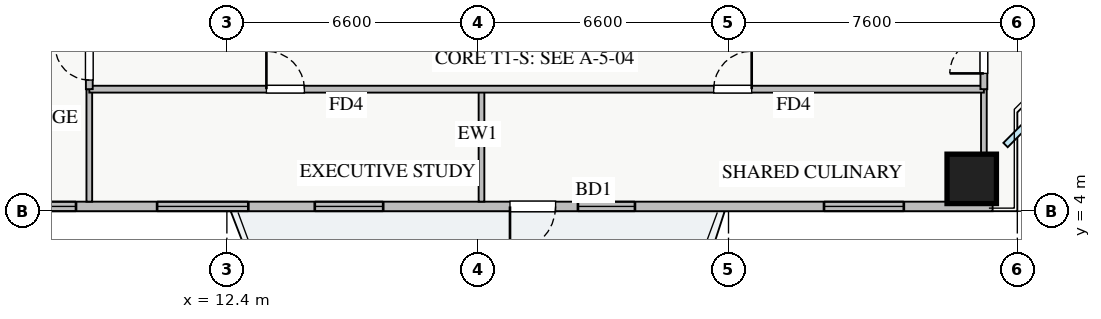
"""IFC4 building model, lengths in metres.
Left out: names, types, materials, properties, quantities, classifications, styles, units other than length and angle.
Written with IfcOpenShell. Run it as: python <this file> out.ifc"""

import sys

from ifc_helpers import new_model, si_unit, direction, frame, frame_2d, origin, origin_2d, place, context, subcontext, project, spatial, rectangle, extrude, source, transform, mapped, element, fill, save


model = new_model("IFC4")
c1 = context("Model", 3, precision=1e-05, world=origin(), true_north=direction((0.0, 1.0)))
c2 = subcontext(c1, "Body", "Model", "MODEL_VIEW")
j1 = project(units=[si_unit("LENGTHUNIT", "METRE"), si_unit("PLANEANGLEUNIT", "RADIAN")], contexts=[c1])
p1 = place(None, origin())
s1 = spatial("IfcSite", under=j1, at=p1, CompositionType="ELEMENT")
p2 = place(p1, origin())
s2 = spatial("IfcBuilding", under=s1, at=p2, CompositionType="ELEMENT")
p3 = place(p2, frame((0.0, 0.0, 69.75)))
s3 = spatial("IfcBuildingStorey", under=s2, at=p3, CompositionType="ELEMENT", Elevation=69.75)
m1 = source(origin(), c2, "Body", "SweptSolid", [
    extrude(rectangle(XDim=1.3, YDim=1.3, at=origin_2d()), origin(), (0.0, 0.0, 1.0), 3.25),
])
p4 = place(p3, frame((32.0, 4.85, 0.0), z_axis=(0.0, 0.0, 1.0), x_axis=(1.0, 0.0, 0.0)))
e1 = element("IfcColumn", 1, at=p4, inside=s3, PredefinedType="COLUMN", context=c2, shape_type="MappedRepresentation", body=[
    mapped(m1, transform((0.0, 0.0, 0.0), x_axis=(1.0, 0.0, 0.0), y_axis=(0.0, 1.0, 0.0), z_axis=(0.0, 0.0, 1.0), scale=1.0)),
])
p5 = place(p3, frame((5.45, 4.125, 0.0), z_axis=(0.0, 0.0, 1.0), x_axis=(1.0, 0.0, 0.0)))
e2 = element("IfcWall", 2, at=p5, inside=s3, PredefinedType="STANDARD", context=c2, shape_type="SweptSolid", body=[
    extrude(rectangle(XDim=27.1, YDim=0.25, at=frame_2d((13.55, 0.0))), origin(), (0.0, 0.0, 1.0), 2.61),
])
p6 = place(p5, frame((14.4, 0.0, 0.0)))
e3 = element("IfcOpeningElement", 3, at=p6, cuts=e2, PredefinedType="OPENING", context=c2, shape_type="SweptSolid", body=[
    extrude(rectangle(XDim=1.2, YDim=2.1, at=frame_2d((0.6, 1.05))), frame((0.0, 0.135, 0.0), z_axis=(0.0, -1.0, 0.0), x_axis=(1.0, 0.0, 0.0)), (0.0, 0.0, 1.0), 0.27),
])
p7 = place(p5, frame((1.48, 0.0, 0.9)))
e4 = element("IfcOpeningElement", 4, at=p7, cuts=e2, PredefinedType="OPENING", context=c2, shape_type="SweptSolid", body=[
    extrude(rectangle(XDim=1.5, YDim=1.5, at=frame_2d((0.75, 0.75))), frame((0.0, 0.135, 0.0), z_axis=(0.0, -1.0, 0.0), x_axis=(1.0, 0.0, 0.0)), (0.0, 0.0, 1.0), 0.27),
])
p8 = place(p5, frame((9.263, 0.0, 0.9)))
e5 = element("IfcOpeningElement", 5, at=p8, cuts=e2, PredefinedType="OPENING", context=c2, shape_type="SweptSolid", body=[
    extrude(rectangle(XDim=1.8, YDim=1.45, at=frame_2d((0.9, 0.725))), frame((0.0, 0.135, 0.0), z_axis=(0.0, -1.0, 0.0), x_axis=(1.0, 0.0, 0.0)), (0.0, 0.0, 1.0), 0.27),
])
p9 = place(p5, frame((16.188, 0.0, 0.9)))
e6 = element("IfcOpeningElement", 6, at=p9, cuts=e2, PredefinedType="OPENING", context=c2, shape_type="SweptSolid", body=[
    extrude(rectangle(XDim=1.5, YDim=1.45, at=frame_2d((0.75, 0.725))), frame((0.0, 0.135, 0.0), z_axis=(0.0, -1.0, 0.0), x_axis=(1.0, 0.0, 0.0)), (0.0, 0.0, 1.0), 0.27),
])
p10 = place(p5, frame((22.663, 0.0, 0.9)))
e7 = element("IfcOpeningElement", 7, at=p10, cuts=e2, PredefinedType="OPENING", context=c2, shape_type="SweptSolid", body=[
    extrude(rectangle(XDim=2.1, YDim=1.48, at=frame_2d((1.05, 0.74))), frame((0.0, 0.135, 0.0), z_axis=(0.0, -1.0, 0.0), x_axis=(1.0, 0.0, 0.0)), (0.0, 0.0, 1.0), 0.27),
])
p11 = place(p5, frame((5.114, 0.0, 0.9)))
e8 = element("IfcOpeningElement", 8, at=p11, cuts=e2, PredefinedType="OPENING", context=c2, shape_type="SweptSolid", body=[
    extrude(rectangle(XDim=2.4, YDim=1.5, at=frame_2d((1.2, 0.75))), frame((0.0, 0.135, 0.0), z_axis=(0.0, -1.0, 0.0), x_axis=(1.0, 0.0, 0.0)), (0.0, 0.0, 1.0), 0.27),
])
p12 = place(p3, frame((19.1, 4.25, 0.0), z_axis=(0.0, 0.0, 1.0), x_axis=(0.0, 1.0, 0.0)))
e9 = element("IfcWall", 9, at=p12, inside=s3, PredefinedType="PARTITIONING", context=c2, shape_type="SweptSolid", body=[
    extrude(rectangle(XDim=2.96, YDim=0.15, at=frame_2d((1.48, 0.0))), origin(), (0.0, 0.0, 1.0), 2.765),
])
for number, where, z_axis, x_axis in (
    (10, (8.78, 4.25, 0.0), (0.0, 0.0, 1.0), (0.0, 1.0, 0.0)),
    (11, (32.32, 4.25, 0.0), (0.0, 0.0, 1.0), (0.0, 1.0, 0.0)),
):
    element("IfcWall", number, at=place(p3, frame(where, z_axis=z_axis, x_axis=x_axis)), inside=s3, PredefinedType="PARTITIONING", context=c2, shape_type="SweptSolid", body=[
        extrude(rectangle(XDim=2.96, YDim=0.15, at=frame_2d((1.48, 0.0))), origin(), (0.0, 0.0, 1.0), 3.07),
    ])
p13 = place(p3, frame((8.78, 7.21, 0.0), z_axis=(0.0, 0.0, 1.0), x_axis=(1.0, 0.0, 0.0)))
e12 = element("IfcWall", 12, at=p13, inside=s3, PredefinedType="PARTITIONING", context=c2, shape_type="SweptSolid", body=[
    extrude(rectangle(XDim=23.54, YDim=0.18, at=frame_2d((11.77, 0.0))), origin(), (0.0, 0.0, 1.0), 3.07),
])
p14 = place(p13, frame((4.66, 0.0, 0.0)))
e13 = element("IfcOpeningElement", 13, at=p14, cuts=e12, PredefinedType="OPENING", context=c2, shape_type="SweptSolid", body=[
    extrude(rectangle(XDim=1.0, YDim=2.05, at=frame_2d((0.5, 1.025))), frame((0.0, 0.1, 0.0), z_axis=(0.0, -1.0, 0.0), x_axis=(1.0, 0.0, 0.0)), (0.0, 0.0, 1.0), 0.2),
])
p15 = place(p13, frame((16.43, 0.0, 0.0)))
e14 = element("IfcOpeningElement", 14, at=p15, cuts=e12, PredefinedType="OPENING", context=c2, shape_type="SweptSolid", body=[
    extrude(rectangle(XDim=1.0, YDim=2.05, at=frame_2d((0.5, 1.025))), frame((0.0, 0.1, 0.0), z_axis=(0.0, -1.0, 0.0), x_axis=(1.0, 0.0, 0.0)), (0.0, 0.0, 1.0), 0.2),
])
p16 = place(p3, frame((8.78, 7.21, 0.0), z_axis=(0.0, 0.0, 1.0), x_axis=(0.0, 1.0, 0.0)))
e15 = element("IfcWall", 15, at=p16, inside=s3, PredefinedType="PARTITIONING", context=c2, shape_type="SweptSolid", body=[
    extrude(rectangle(XDim=31.23, YDim=0.18, at=frame_2d((15.615, 0.0))), origin(), (0.0, 0.0, 1.0), 3.07),
])
p17 = place(p16, frame((30.09, 0.0, 0.0)))
e16 = element("IfcOpeningElement", 16, at=p17, cuts=e15, PredefinedType="OPENING", context=c2, shape_type="SweptSolid", body=[
    extrude(rectangle(XDim=0.9, YDim=2.05, at=frame_2d((0.45, 1.025))), frame((0.0, 0.1, 0.0), z_axis=(0.0, -1.0, 0.0), x_axis=(1.0, 0.0, 0.0)), (0.0, 0.0, 1.0), 0.2),
])
p18 = place(p16, frame((0.24, 0.0, 0.0)))
e17 = element("IfcOpeningElement", 17, at=p18, cuts=e15, PredefinedType="OPENING", context=c2, shape_type="SweptSolid", body=[
    extrude(rectangle(XDim=0.9, YDim=2.05, at=frame_2d((0.45, 1.025))), frame((0.0, 0.1, 0.0), z_axis=(0.0, -1.0, 0.0), x_axis=(1.0, 0.0, 0.0)), (0.0, 0.0, 1.0), 0.2),
])
p19 = place(p16, frame((2.84, 0.0, 0.0)))
e18 = element("IfcOpeningElement", 18, at=p19, cuts=e15, PredefinedType="OPENING", context=c2, shape_type="SweptSolid", body=[
    extrude(rectangle(XDim=1.0, YDim=2.05, at=frame_2d((0.5, 1.025))), frame((0.0, 0.1, 0.0), z_axis=(0.0, -1.0, 0.0), x_axis=(1.0, 0.0, 0.0)), (0.0, 0.0, 1.0), 0.2),
])
p20 = place(p16, frame((12.11, 0.0, 0.0)))
e19 = element("IfcOpeningElement", 19, at=p20, cuts=e15, PredefinedType="OPENING", context=c2, shape_type="SweptSolid", body=[
    extrude(rectangle(XDim=1.0, YDim=2.05, at=frame_2d((0.5, 1.025))), frame((0.0, 0.1, 0.0), z_axis=(0.0, -1.0, 0.0), x_axis=(1.0, 0.0, 0.0)), (0.0, 0.0, 1.0), 0.2),
])
p21 = place(p16, frame((24.62, 0.0, 0.0)))
e20 = element("IfcOpeningElement", 20, at=p21, cuts=e15, PredefinedType="OPENING", context=c2, shape_type="SweptSolid", body=[
    extrude(rectangle(XDim=1.0, YDim=2.05, at=frame_2d((0.5, 1.025))), frame((0.0, 0.1, 0.0), z_axis=(0.0, -1.0, 0.0), x_axis=(1.0, 0.0, 0.0)), (0.0, 0.0, 1.0), 0.2),
])
p22 = place(p3, frame((32.32, 7.21, 0.0), z_axis=(0.0, 0.0, 1.0), x_axis=(0.0, 1.0, 0.0)))
e21 = element("IfcWall", 21, at=p22, inside=s3, PredefinedType="PARTITIONING", context=c2, shape_type="SweptSolid", body=[
    extrude(rectangle(XDim=31.23, YDim=0.18, at=frame_2d((15.615, 0.0))), origin(), (0.0, 0.0, 1.0), 2.765),
])
p23 = place(p22, frame((30.09, 0.0, 0.0)))
e22 = element("IfcOpeningElement", 22, at=p23, cuts=e21, PredefinedType="OPENING", context=c2, shape_type="SweptSolid", body=[
    extrude(rectangle(XDim=0.9, YDim=2.05, at=frame_2d((0.45, 1.025))), frame((0.0, 0.1, 0.0), z_axis=(0.0, -1.0, 0.0), x_axis=(1.0, 0.0, 0.0)), (0.0, 0.0, 1.0), 0.2),
])
p24 = place(p22, frame((0.415, 0.0, 0.0)))
e23 = element("IfcOpeningElement", 23, at=p24, cuts=e21, PredefinedType="OPENING", context=c2, shape_type="SweptSolid", body=[
    extrude(rectangle(XDim=0.9, YDim=2.05, at=frame_2d((0.45, 1.025))), frame((0.0, 0.1, 0.0), z_axis=(0.0, -1.0, 0.0), x_axis=(1.0, 0.0, 0.0)), (0.0, 0.0, 1.0), 0.2),
])
p25 = place(p22, frame((4.99, 0.0, 0.0)))
e24 = element("IfcOpeningElement", 24, at=p25, cuts=e21, PredefinedType="OPENING", context=c2, shape_type="SweptSolid", body=[
    extrude(rectangle(XDim=1.0, YDim=2.05, at=frame_2d((0.5, 1.025))), frame((0.0, 0.1, 0.0), z_axis=(0.0, -1.0, 0.0), x_axis=(1.0, 0.0, 0.0)), (0.0, 0.0, 1.0), 0.2),
])
p26 = place(p22, frame((19.355, 0.0, 0.0)))
e25 = element("IfcOpeningElement", 25, at=p26, cuts=e21, PredefinedType="OPENING", context=c2, shape_type="SweptSolid", body=[
    extrude(rectangle(XDim=1.0, YDim=2.05, at=frame_2d((0.5, 1.025))), frame((0.0, 0.1, 0.0), z_axis=(0.0, -1.0, 0.0), x_axis=(1.0, 0.0, 0.0)), (0.0, 0.0, 1.0), 0.2),
])
m2 = source(origin(), c2, "Body", "SweptSolid", [
    extrude(rectangle(XDim=1.2, YDim=2.1, at=frame_2d((0.6, 1.05))), frame((0.0, 0.025, 0.0), z_axis=(0.0, -1.0, 0.0), x_axis=(1.0, 0.0, 0.0)), (0.0, 0.0, 1.0), 0.05),
])
p27 = place(p6, frame((1.2, 0.0, 0.0), z_axis=(0.0, 0.0, 1.0), x_axis=(-1.0, 0.0, 0.0)))
e26 = element("IfcDoor", 26, at=p27, inside=s3, OperationType="SINGLE_SWING_LEFT", PredefinedType="DOOR", context=c2, shape_type="MappedRepresentation", body=[
    mapped(m2, transform((0.0, 0.0, 0.0), x_axis=(1.0, 0.0, 0.0), y_axis=(0.0, 1.0, 0.0), z_axis=(0.0, 0.0, 1.0), scale=1.0)),
])
fill(e3, e26)
m3 = source(origin(), c2, "Body", "SweptSolid", [
    extrude(rectangle(XDim=1.5, YDim=1.5, at=frame_2d((0.75, 0.75))), frame((0.0, 0.03, 0.0), z_axis=(0.0, -1.0, 0.0), x_axis=(1.0, 0.0, 0.0)), (0.0, 0.0, 1.0), 0.06),
])
p28 = place(p7, origin())
e27 = element("IfcWindow", 27, at=p28, inside=s3, PartitioningType="TRIPLE_PANEL_VERTICAL", PredefinedType="WINDOW", context=c2, shape_type="MappedRepresentation", body=[
    mapped(m3, transform((0.0, 0.0, 0.0), x_axis=(1.0, 0.0, 0.0), y_axis=(0.0, 1.0, 0.0), z_axis=(0.0, 0.0, 1.0), scale=1.0)),
])
fill(e4, e27)
m4 = source(origin(), c2, "Body", "SweptSolid", [
    extrude(rectangle(XDim=1.8, YDim=1.45, at=frame_2d((0.9, 0.725))), frame((0.0, 0.03, 0.0), z_axis=(0.0, -1.0, 0.0), x_axis=(1.0, 0.0, 0.0)), (0.0, 0.0, 1.0), 0.06),
])
p29 = place(p8, origin())
e28 = element("IfcWindow", 28, at=p29, inside=s3, PartitioningType="DOUBLE_PANEL_VERTICAL", PredefinedType="WINDOW", context=c2, shape_type="MappedRepresentation", body=[
    mapped(m4, transform((0.0, 0.0, 0.0), x_axis=(1.0, 0.0, 0.0), y_axis=(0.0, 1.0, 0.0), z_axis=(0.0, 0.0, 1.0), scale=1.0)),
])
fill(e5, e28)
m5 = source(origin(), c2, "Body", "SweptSolid", [
    extrude(rectangle(XDim=1.5, YDim=1.45, at=frame_2d((0.75, 0.725))), frame((0.0, 0.03, 0.0), z_axis=(0.0, -1.0, 0.0), x_axis=(1.0, 0.0, 0.0)), (0.0, 0.0, 1.0), 0.06),
])
p30 = place(p9, origin())
e29 = element("IfcWindow", 29, at=p30, inside=s3, PartitioningType="DOUBLE_PANEL_VERTICAL", PredefinedType="WINDOW", context=c2, shape_type="MappedRepresentation", body=[
    mapped(m5, transform((0.0, 0.0, 0.0), x_axis=(1.0, 0.0, 0.0), y_axis=(0.0, 1.0, 0.0), z_axis=(0.0, 0.0, 1.0), scale=1.0)),
])
fill(e6, e29)
m6 = source(origin(), c2, "Body", "SweptSolid", [
    extrude(rectangle(XDim=2.1, YDim=1.48, at=frame_2d((1.05, 0.74))), frame((0.0, 0.03, 0.0), z_axis=(0.0, -1.0, 0.0), x_axis=(1.0, 0.0, 0.0)), (0.0, 0.0, 1.0), 0.06),
])
p31 = place(p10, origin())
e30 = element("IfcWindow", 30, at=p31, inside=s3, PartitioningType="TRIPLE_PANEL_VERTICAL", PredefinedType="WINDOW", context=c2, shape_type="MappedRepresentation", body=[
    mapped(m6, transform((0.0, 0.0, 0.0), x_axis=(1.0, 0.0, 0.0), y_axis=(0.0, 1.0, 0.0), z_axis=(0.0, 0.0, 1.0), scale=1.0)),
])
fill(e7, e30)
m7 = source(origin(), c2, "Body", "SweptSolid", [
    extrude(rectangle(XDim=1.0, YDim=2.05, at=frame_2d((0.5, 1.025))), frame((0.0, 0.025, 0.0), z_axis=(0.0, -1.0, 0.0), x_axis=(1.0, 0.0, 0.0)), (0.0, 0.0, 1.0), 0.05),
])
p32 = place(p14, origin())
e31 = element("IfcDoor", 31, at=p32, inside=s3, OperationType="SINGLE_SWING_LEFT", PredefinedType="DOOR", context=c2, shape_type="MappedRepresentation", body=[
    mapped(m7, transform((0.0, 0.0, 0.0), x_axis=(1.0, 0.0, 0.0), y_axis=(0.0, 1.0, 0.0), z_axis=(0.0, 0.0, 1.0), scale=1.0)),
])
fill(e13, e31)
p33 = place(p15, origin())
e32 = element("IfcDoor", 32, at=p33, inside=s3, OperationType="SINGLE_SWING_RIGHT", PredefinedType="DOOR", context=c2, shape_type="MappedRepresentation", body=[
    mapped(m7, transform((0.0, 0.0, 0.0), x_axis=(1.0, 0.0, 0.0), y_axis=(0.0, 1.0, 0.0), z_axis=(0.0, 0.0, 1.0), scale=1.0)),
])
fill(e14, e32)
m8 = source(origin(), c2, "Body", "SweptSolid", [
    extrude(rectangle(XDim=0.9, YDim=2.05, at=frame_2d((0.45, 1.025))), frame((0.0, 0.025, 0.0), z_axis=(0.0, -1.0, 0.0), x_axis=(1.0, 0.0, 0.0)), (0.0, 0.0, 1.0), 0.05),
])
p34 = place(p18, origin())
e33 = element("IfcDoor", 33, at=p34, inside=s3, OperationType="SINGLE_SWING_RIGHT", PredefinedType="DOOR", context=c2, shape_type="MappedRepresentation", body=[
    mapped(m8, transform((0.0, 0.0, 0.0), x_axis=(1.0, 0.0, 0.0), y_axis=(0.0, 1.0, 0.0), z_axis=(0.0, 0.0, 1.0), scale=1.0)),
])
fill(e17, e33)
p35 = place(p24, origin())
e34 = element("IfcDoor", 34, at=p35, inside=s3, OperationType="SINGLE_SWING_LEFT", PredefinedType="DOOR", context=c2, shape_type="MappedRepresentation", body=[
    mapped(m8, transform((0.0, 0.0, 0.0), x_axis=(1.0, 0.0, 0.0), y_axis=(0.0, 1.0, 0.0), z_axis=(0.0, 0.0, 1.0), scale=1.0)),
])
fill(e23, e34)
m9 = source(origin(), c2, "Body", "SweptSolid", [
    extrude(rectangle(XDim=2.4, YDim=1.5, at=frame_2d((1.2, 0.75))), frame((0.0, 0.03, 0.0), z_axis=(0.0, -1.0, 0.0), x_axis=(1.0, 0.0, 0.0)), (0.0, 0.0, 1.0), 0.06),
])
p36 = place(p11, origin())
e35 = element("IfcWindow", 35, at=p36, inside=s3, PartitioningType="TRIPLE_PANEL_VERTICAL", PredefinedType="WINDOW", context=c2, shape_type="MappedRepresentation", body=[
    mapped(m9, transform((0.0, 0.0, 0.0), x_axis=(1.0, 0.0, 0.0), y_axis=(0.0, 1.0, 0.0), z_axis=(0.0, 0.0, 1.0), scale=1.0)),
])
fill(e8, e35)
save(model, sys.argv[1])
